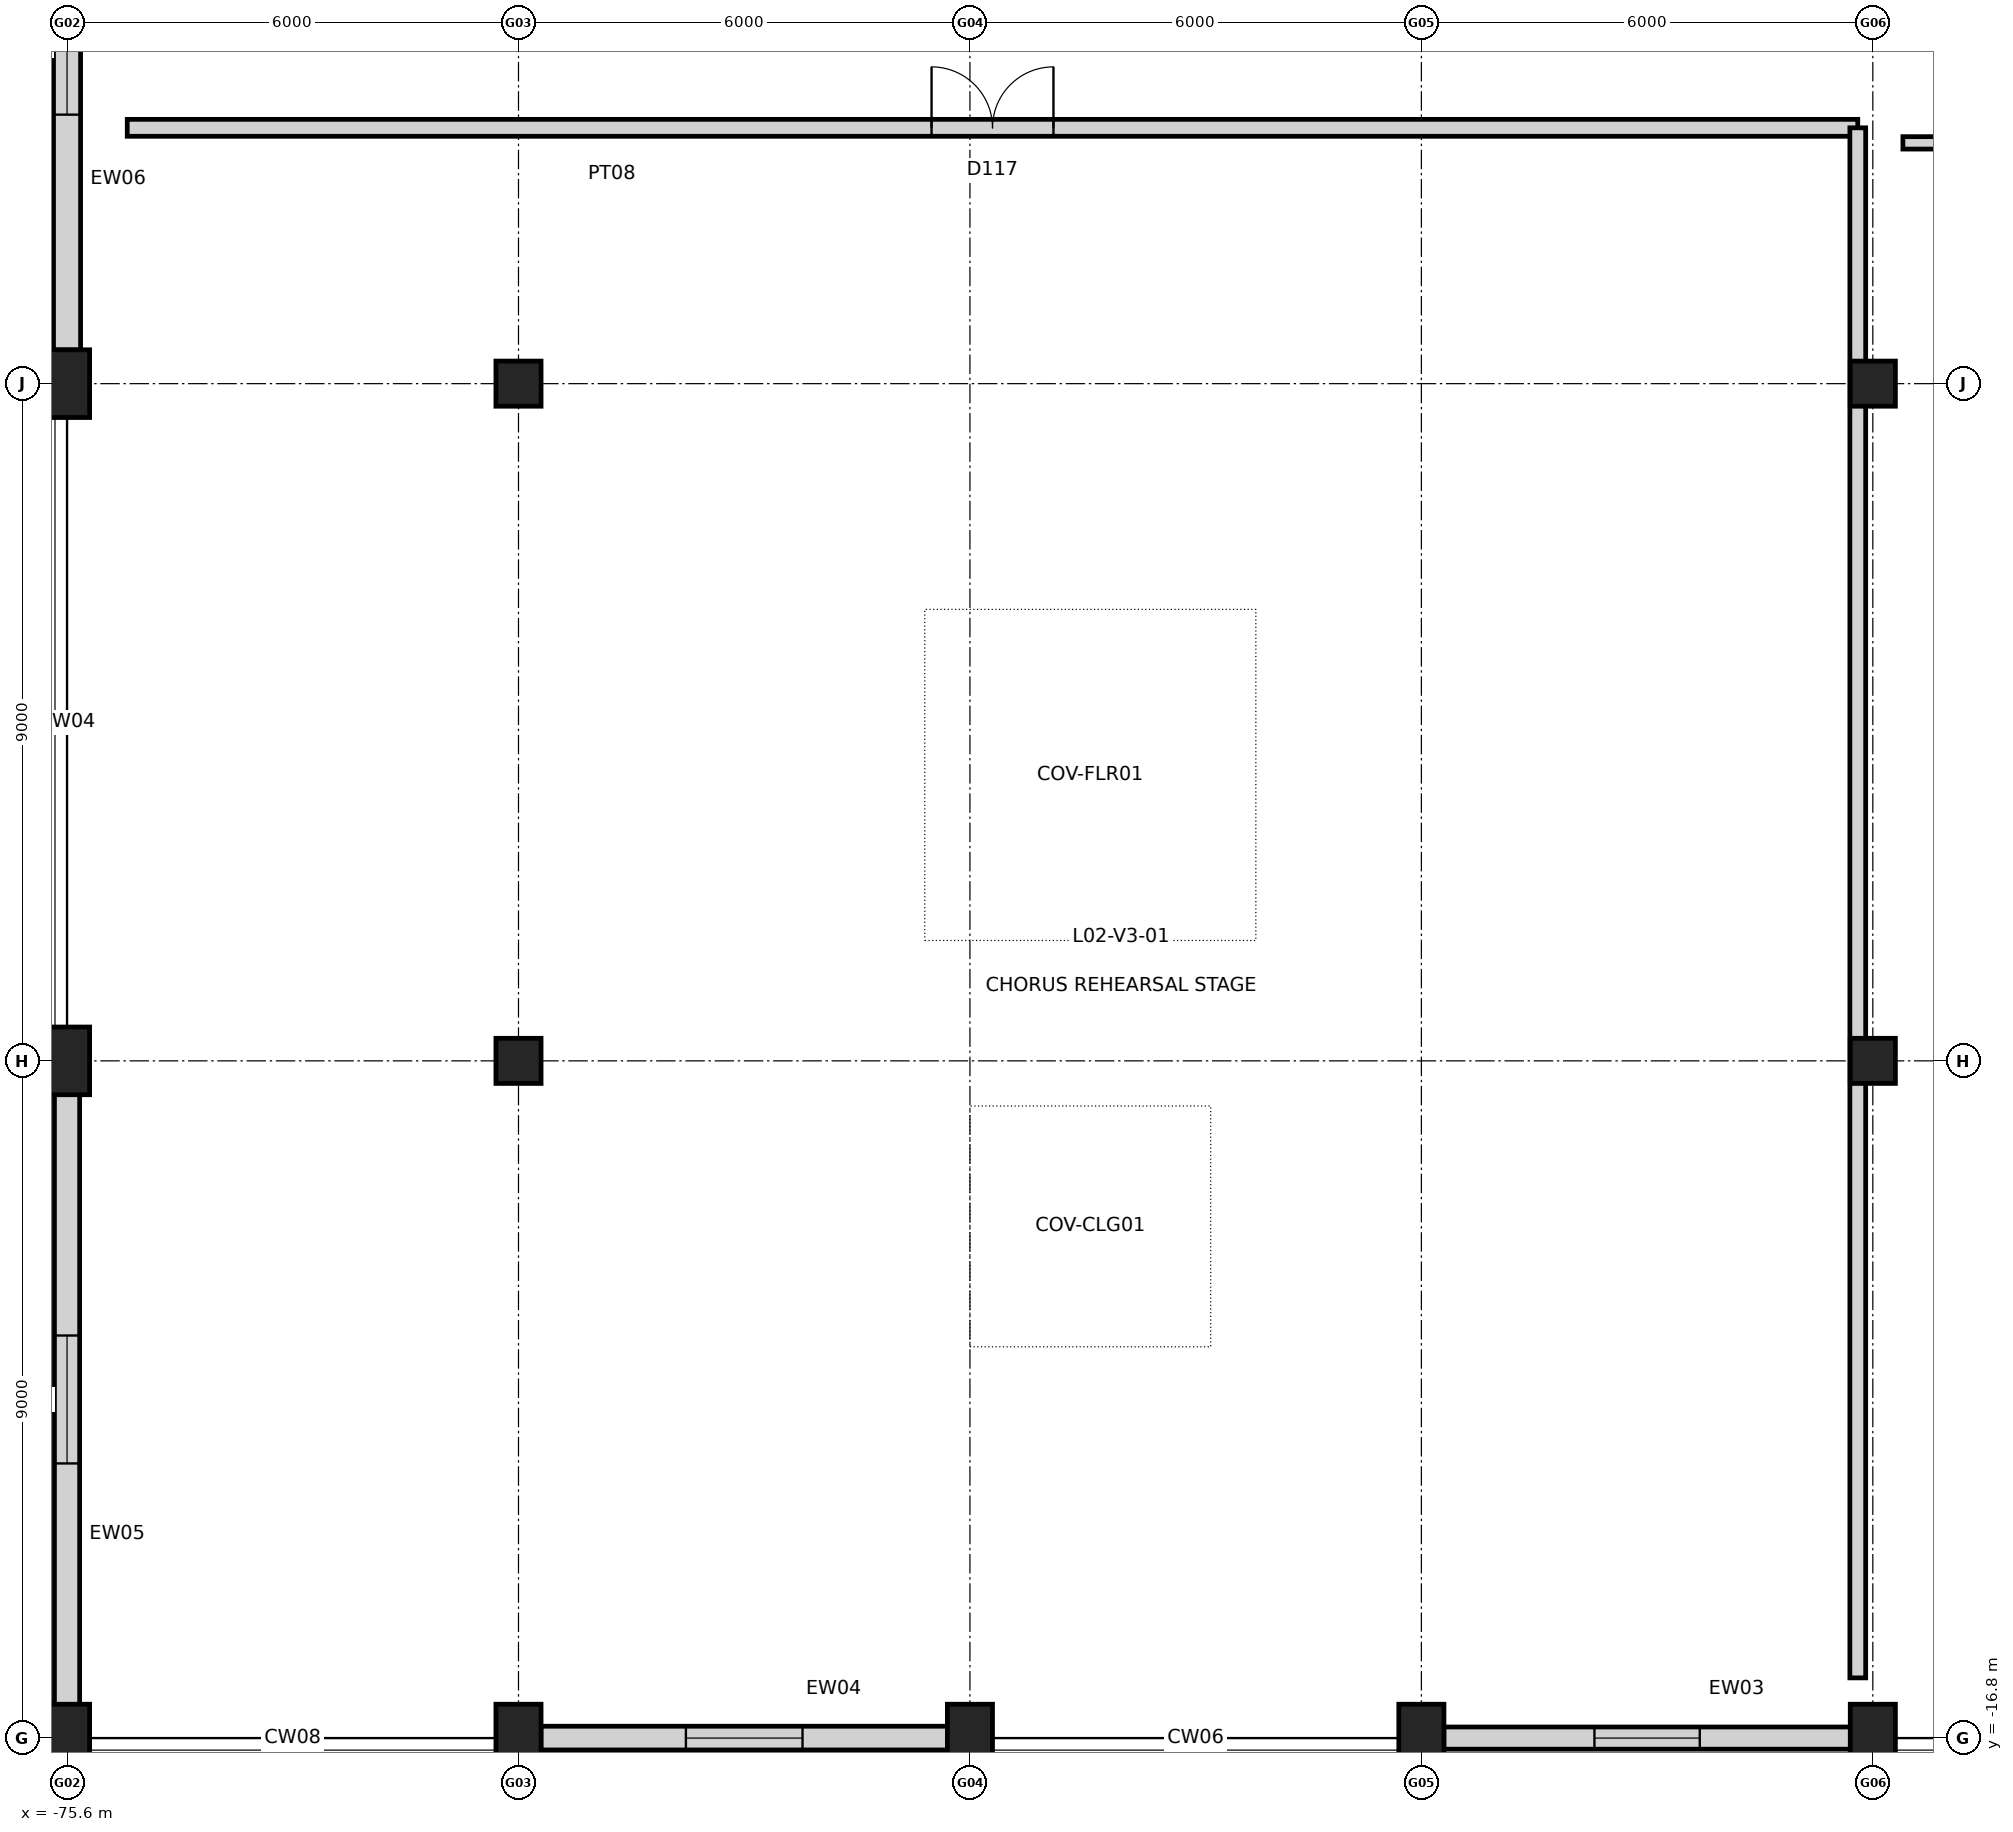
"""IFC4 building model, lengths in metres.
Left out: names, types, materials, properties, quantities, classifications, styles, units other than length and angle.
Written with IfcOpenShell. Run it as: python <this file> out.ifc"""

import sys

from ifc_helpers import new_model, si_unit, direction, frame, frame_2d, origin, origin_2d, place, context, subcontext, project, spatial, rectangle, extrude, element, fill, save


model = new_model("IFC4")
c1 = context("Model", 3, precision=1e-05, world=origin(), true_north=direction((0.0, 1.0)))
c2 = subcontext(c1, "Body", "Model", "MODEL_VIEW")
j1 = project(units=[si_unit("LENGTHUNIT", "METRE"), si_unit("PLANEANGLEUNIT", "RADIAN")], contexts=[c1])
p1 = place(None, origin())
s1 = spatial("IfcSite", under=j1, at=p1, CompositionType="ELEMENT")
p2 = place(p1, origin())
s2 = spatial("IfcBuilding", under=s1, at=p2, CompositionType="ELEMENT")
p3 = place(p2, frame((0.0, 0.0, 10.2)))
s3 = spatial("IfcBuildingStorey", under=s2, at=p3, CompositionType="ELEMENT", Elevation=10.2)
for number, where, z_axis, x_axis in (
    (1, (-75.6, -16.8, 0.0), (0.0, 0.0, 1.0), (1.0, 0.0, 0.0)),
    (2, (-75.6, -7.8, 0.0), (0.0, 0.0, 1.0), (1.0, 0.0, 0.0)),
    (3, (-75.6, 1.2, 0.0), (0.0, 0.0, 1.0), (1.0, 0.0, 0.0)),
    (4, (-69.6, -16.8, 0.0), (0.0, 0.0, 1.0), (1.0, 0.0, 0.0)),
):
    element("IfcColumn", number, at=place(p3, frame(where, z_axis=z_axis, x_axis=x_axis)), inside=s3, PredefinedType="COLUMN", context=c2, shape_type="SweptSolid", body=[
        extrude(rectangle(XDim=0.6, YDim=0.9, at=origin_2d()), origin(), (0.0, 0.0, 1.0), 4.8),
    ])
for number, where, z_axis, x_axis in (
    (5, (-69.6, -7.8, 0.0), (0.0, 0.0, 1.0), (1.0, 0.0, 0.0)),
    (6, (-69.6, 1.2, 0.0), (0.0, 0.0, 1.0), (1.0, 0.0, 0.0)),
):
    element("IfcColumn", number, at=place(p3, frame(where, z_axis=z_axis, x_axis=x_axis)), inside=s3, PredefinedType="COLUMN", context=c2, shape_type="SweptSolid", body=[
        extrude(rectangle(XDim=0.6, YDim=0.6, at=origin_2d()), origin(), (0.0, 0.0, 1.0), 4.8),
    ])
for number, where, z_axis, x_axis in (
    (7, (-63.6, -16.8, 0.0), (0.0, 0.0, 1.0), (1.0, 0.0, 0.0)),
    (8, (-57.6, -16.8, 0.0), (0.0, 0.0, 1.0), (1.0, 0.0, 0.0)),
    (9, (-51.6, -16.8, 0.0), (0.0, 0.0, 1.0), (1.0, 0.0, 0.0)),
):
    element("IfcColumn", number, at=place(p3, frame(where, z_axis=z_axis, x_axis=x_axis)), inside=s3, PredefinedType="COLUMN", context=c2, shape_type="SweptSolid", body=[
        extrude(rectangle(XDim=0.6, YDim=0.9, at=origin_2d()), origin(), (0.0, 0.0, 1.0), 4.8),
    ])
for number, where, z_axis, x_axis in (
    (10, (-51.6, -7.8, 0.0), (0.0, 0.0, 1.0), (1.0, 0.0, 0.0)),
    (11, (-51.6, 1.2, 0.0), (0.0, 0.0, 1.0), (1.0, 0.0, 0.0)),
):
    element("IfcColumn", number, at=place(p3, frame(where, z_axis=z_axis, x_axis=x_axis)), inside=s3, PredefinedType="COLUMN", context=c2, shape_type="SweptSolid", body=[
        extrude(rectangle(XDim=0.6, YDim=0.6, at=origin_2d()), origin(), (0.0, 0.0, 1.0), 4.8),
    ])
p4 = place(p3, frame((-51.898, -16.8, 0.0), z_axis=(0.0, 0.0, 1.0), x_axis=(-1.0, 0.0, 0.0)))
e12 = element("IfcWall", 12, at=p4, inside=s3, PredefinedType="STANDARD", context=c2, shape_type="SweptSolid", body=[
    extrude(rectangle(XDim=5.404, YDim=0.295, at=frame_2d((2.702, 0.0))), origin(), (0.0, 0.0, 1.0), 3.745),
])
p5 = place(p4, frame((2.002, 0.0, 0.85)))
e13 = element("IfcOpeningElement", 13, at=p5, cuts=e12, PredefinedType="OPENING", context=c2, shape_type="SweptSolid", body=[
    extrude(rectangle(XDim=1.4, YDim=1.6, at=frame_2d((0.7, 0.8))), frame((0.0, 0.157, 0.0), z_axis=(0.0, -1.0, 0.0), x_axis=(1.0, 0.0, 0.0)), (0.0, 0.0, 1.0), 0.315),
])
p6 = place(p3, frame((-63.898, -16.8, 0.0), z_axis=(0.0, 0.0, 1.0), x_axis=(-1.0, 0.0, 0.0)))
e14 = element("IfcWall", 14, at=p6, inside=s3, PredefinedType="STANDARD", context=c2, shape_type="SweptSolid", body=[
    extrude(rectangle(XDim=5.404, YDim=0.315, at=frame_2d((2.702, 0.0))), origin(), (0.0, 0.0, 1.0), 3.745),
])
p7 = place(p6, frame((1.927, 0.0, 0.85)))
e15 = element("IfcOpeningElement", 15, at=p7, cuts=e14, PredefinedType="OPENING", context=c2, shape_type="SweptSolid", body=[
    extrude(rectangle(XDim=1.55, YDim=1.75, at=frame_2d((0.775, 0.875))), frame((0.0, 0.167, 0.0), z_axis=(0.0, -1.0, 0.0), x_axis=(1.0, 0.0, 0.0)), (0.0, 0.0, 1.0), 0.335),
])
p8 = place(p3, frame((-75.6, -16.352, 0.0), z_axis=(0.0, 0.0, 1.0), x_axis=(0.0, 1.0, 0.0)))
e16 = element("IfcWall", 16, at=p8, inside=s3, PredefinedType="STANDARD", context=c2, shape_type="SweptSolid", body=[
    extrude(rectangle(XDim=8.104, YDim=0.335, at=frame_2d((4.052, 0.0))), origin(), (0.0, 0.0, 1.0), 3.829),
])
p9 = place(p8, frame((3.202, 0.0, 0.85)))
e17 = element("IfcOpeningElement", 17, at=p9, cuts=e16, PredefinedType="OPENING", context=c2, shape_type="SweptSolid", body=[
    extrude(rectangle(XDim=1.7, YDim=1.75, at=frame_2d((0.85, 0.875))), frame((0.0, 0.177, 0.0), z_axis=(0.0, -1.0, 0.0), x_axis=(1.0, 0.0, 0.0)), (0.0, 0.0, 1.0), 0.355),
])
p10 = place(p3, frame((-75.6, 1.648, 0.0), z_axis=(0.0, 0.0, 1.0), x_axis=(0.0, 1.0, 0.0)))
e18 = element("IfcWall", 18, at=p10, inside=s3, PredefinedType="STANDARD", context=c2, shape_type="SweptSolid", body=[
    extrude(rectangle(XDim=8.104, YDim=0.36, at=frame_2d((4.052, 0.0))), origin(), (0.0, 0.0, 1.0), 3.829),
])
p11 = place(p10, frame((3.127, 0.0, 0.85)))
e19 = element("IfcOpeningElement", 19, at=p11, cuts=e18, PredefinedType="OPENING", context=c2, shape_type="SweptSolid", body=[
    extrude(rectangle(XDim=1.85, YDim=1.75, at=frame_2d((0.925, 0.875))), frame((0.0, 0.19, 0.0), z_axis=(0.0, -1.0, 0.0), x_axis=(1.0, 0.0, 0.0)), (0.0, 0.0, 1.0), 0.38),
])
p12 = place(p3, frame((-74.8, 4.6, 0.0), z_axis=(0.0, 0.0, 1.0), x_axis=(1.0, 0.0, 0.0)))
e20 = element("IfcWall", 20, at=p12, inside=s3, PredefinedType="PARTITIONING", context=c2, shape_type="SweptSolid", body=[
    extrude(rectangle(XDim=23.0, YDim=0.225, at=frame_2d((11.5, 0.0))), origin(), (0.0, 0.0, 1.0), 4.42),
])
p13 = place(p12, frame((10.69, 0.0, 0.0)))
e21 = element("IfcOpeningElement", 21, at=p13, cuts=e20, PredefinedType="OPENING", context=c2, shape_type="SweptSolid", body=[
    extrude(rectangle(XDim=1.62, YDim=2.2, at=frame_2d((0.81, 1.1))), frame((0.0, 0.123, 0.0), z_axis=(0.0, -1.0, 0.0), x_axis=(1.0, 0.0, 0.0)), (0.0, 0.0, 1.0), 0.245),
])
p14 = place(p3, frame((-51.8, -16.0, 0.0), z_axis=(0.0, 0.0, 1.0), x_axis=(0.0, 1.0, 0.0)))
e22 = element("IfcWall", 22, at=p14, inside=s3, PredefinedType="PARTITIONING", context=c2, shape_type="SweptSolid", body=[
    extrude(rectangle(XDim=20.6, YDim=0.21, at=frame_2d((10.3, 0.0))), origin(), (0.0, 0.0, 1.0), 3.59),
])
p15 = place(p3, frame((-51.2, 4.4, 0.0), z_axis=(0.0, 0.0, 1.0), x_axis=(1.0, 0.0, 0.0)))
e23 = element("IfcWall", 23, at=p15, inside=s3, PredefinedType="PARTITIONING", context=c2, shape_type="SweptSolid", body=[
    extrude(rectangle(XDim=6.4, YDim=0.165, at=frame_2d((3.2, 0.0))), origin(), (0.0, 0.0, 1.0), 4.42),
])
p16 = place(p15, frame((2.68, 0.0, 0.0)))
e24 = element("IfcOpeningElement", 24, at=p16, cuts=e23, PredefinedType="OPENING", context=c2, shape_type="SweptSolid", body=[
    extrude(rectangle(XDim=1.04, YDim=2.2, at=frame_2d((0.52, 1.1))), frame((0.0, 0.093, 0.0), z_axis=(0.0, -1.0, 0.0), x_axis=(1.0, 0.0, 0.0)), (0.0, 0.0, 1.0), 0.185),
])
p17 = place(p5, origin())
e25 = element("IfcWindow", 25, at=p17, inside=s3, PartitioningType="SINGLE_PANEL", PredefinedType="WINDOW", context=c2, shape_type="SweptSolid", body=[
    extrude(rectangle(XDim=1.4, YDim=1.6, at=frame_2d((0.7, 0.8))), frame((0.0, 0.03, 0.0), z_axis=(0.0, -1.0, 0.0), x_axis=(1.0, 0.0, 0.0)), (0.0, 0.0, 1.0), 0.06),
])
fill(e13, e25)
p18 = place(p7, origin())
e26 = element("IfcWindow", 26, at=p18, inside=s3, PartitioningType="SINGLE_PANEL", PredefinedType="WINDOW", context=c2, shape_type="SweptSolid", body=[
    extrude(rectangle(XDim=1.55, YDim=1.75, at=frame_2d((0.775, 0.875))), frame((0.0, 0.03, 0.0), z_axis=(0.0, -1.0, 0.0), x_axis=(1.0, 0.0, 0.0)), (0.0, 0.0, 1.0), 0.06),
])
fill(e15, e26)
p19 = place(p9, origin())
e27 = element("IfcWindow", 27, at=p19, inside=s3, PartitioningType="SINGLE_PANEL", PredefinedType="WINDOW", context=c2, shape_type="SweptSolid", body=[
    extrude(rectangle(XDim=1.7, YDim=1.75, at=frame_2d((0.85, 0.875))), frame((0.0, 0.03, 0.0), z_axis=(0.0, -1.0, 0.0), x_axis=(1.0, 0.0, 0.0)), (0.0, 0.0, 1.0), 0.06),
])
fill(e17, e27)
p20 = place(p11, origin())
e28 = element("IfcWindow", 28, at=p20, inside=s3, PartitioningType="SINGLE_PANEL", PredefinedType="WINDOW", context=c2, shape_type="SweptSolid", body=[
    extrude(rectangle(XDim=1.85, YDim=1.75, at=frame_2d((0.925, 0.875))), frame((0.0, 0.03, 0.0), z_axis=(0.0, -1.0, 0.0), x_axis=(1.0, 0.0, 0.0)), (0.0, 0.0, 1.0), 0.06),
])
fill(e19, e28)
p21 = place(p13, origin())
e29 = element("IfcDoor", 29, at=p21, inside=s3, OperationType="DOUBLE_DOOR_SINGLE_SWING", PredefinedType="DOOR", context=c2, shape_type="SweptSolid", body=[
    extrude(rectangle(XDim=1.62, YDim=2.2, at=frame_2d((0.81, 1.1))), frame((0.0, 0.025, 0.0), z_axis=(0.0, -1.0, 0.0), x_axis=(1.0, 0.0, 0.0)), (0.0, 0.0, 1.0), 0.05),
])
fill(e21, e29)
save(model, sys.argv[1])
